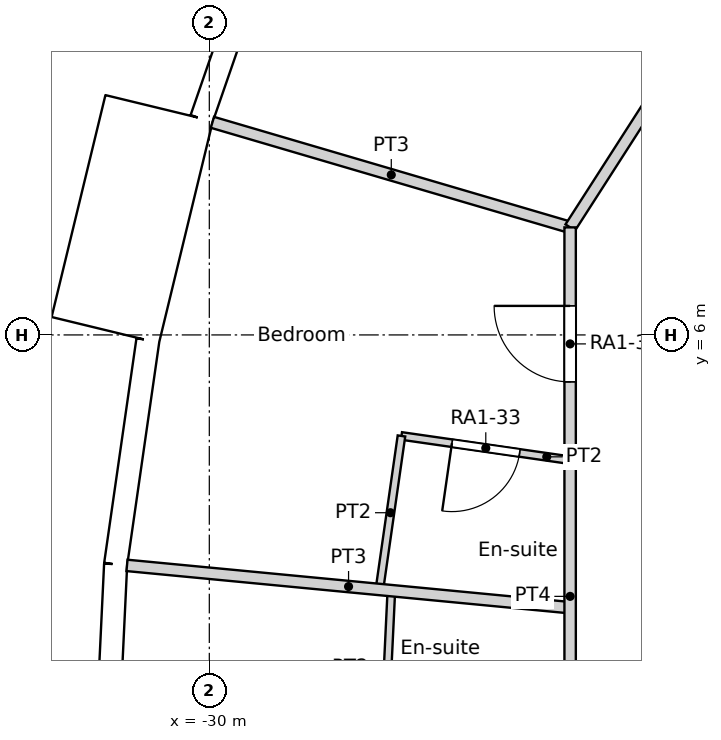
"""IFC4 building model, lengths in metres.
Left out: names, types, materials, properties, quantities, classifications, styles, units other than length and angle.
Written with IfcOpenShell. Run it as: python <this file> out.ifc"""

import sys

from ifc_helpers import new_model, si_unit, direction, frame, frame_2d, origin, origin_2d, place, context, subcontext, project, spatial, rectangle, circle, extrude, element, fill, save


model = new_model("IFC4")
c1 = context("Model", 3, precision=1e-05, world=origin(), true_north=direction((0.0, 1.0)))
c2 = subcontext(c1, "Body", "Model", "MODEL_VIEW")
j1 = project(units=[si_unit("LENGTHUNIT", "METRE"), si_unit("PLANEANGLEUNIT", "RADIAN")], contexts=[c1])
p1 = place(None, origin())
s1 = spatial("IfcSite", under=j1, at=p1, CompositionType="ELEMENT")
p2 = place(p1, origin())
s2 = spatial("IfcBuilding", under=s1, at=p2, CompositionType="ELEMENT")
p3 = place(p2, frame((0.0, 0.0, 28.2)))
s3 = spatial("IfcBuildingStorey", under=s2, at=p3, CompositionType="ELEMENT", Elevation=28.2)
for number, where, z_axis, x_axis in (
    (1, (-29.048, 8.529, 0.0), (0.0, 0.0, 1.0), (1.0, 0.0, 0.0)),
    (2, (-30.137, 2.878, 0.0), (0.0, 0.0, 1.0), (1.0, 0.0, 0.0)),
):
    element("IfcColumn", number, at=place(p3, frame(where, z_axis=z_axis, x_axis=x_axis)), inside=s3, PredefinedType="COLUMN", context=c2, shape_type="SweptSolid", body=[
        extrude(circle(Radius=0.7, at=origin_2d()), origin(), (0.0, 0.0, 1.0), 3.6),
    ])
p4 = place(p3, frame((-24.382, 2.85, 0.0), z_axis=(0.0, 0.0, 1.0), x_axis=(1.0, 0.0, 0.0)))
e3 = element("IfcColumn", 3, at=p4, inside=s3, PredefinedType="COLUMN", context=c2, shape_type="SweptSolid", body=[
    extrude(circle(Radius=0.75, at=origin_2d()), origin(), (0.0, 0.0, 1.0), 3.6),
])
p5 = place(p3, frame((-29.127, 11.661, 0.0), z_axis=(0.0, 0.0, 1.0), x_axis=(-0.327096492592, -0.944990944154, 0.0)))
e4 = element("IfcWall", 4, at=p5, inside=s3, PredefinedType="SOLIDWALL", context=c2, shape_type="SweptSolid", body=[
    extrude(rectangle(XDim=2.979, YDim=0.3, at=frame_2d((1.49, 0.0))), origin(), (0.0, 0.0, 1.0), 3.15),
])
p6 = place(p5, frame((1.49, 0.0, 1.55)))
e5 = element("IfcOpeningElement", 5, at=p6, cuts=e4, PredefinedType="OPENING", context=c2, shape_type="SweptSolid", body=[
    extrude(circle(Radius=0.9, at=origin_2d()), frame((0.0, 0.16, 0.0), z_axis=(0.0, -1.0, 0.0), x_axis=(1.0, 0.0, 0.0)), (0.0, 0.0, 1.0), 0.32),
])
p7 = place(p3, frame((-30.661, 8.982, -0.45), z_axis=(0.0, 0.0, 1.0), x_axis=(-0.235751415068, -0.971813392732, 0.0)))
e6 = element("IfcWall", 6, at=p7, inside=s3, PredefinedType="ELEMENTEDWALL", context=c2, shape_type="SweptSolid", body=[
    extrude(rectangle(XDim=3.0, YDim=1.45, at=frame_2d((1.5, 0.0))), origin(), (0.0, 0.0, 1.0), 3.6),
])
p8 = place(p7, frame((1.5, 0.0, 2.0)))
e7 = element("IfcOpeningElement", 7, at=p8, cuts=e6, PredefinedType="OPENING", context=c2, shape_type="SweptSolid", body=[
    extrude(circle(Radius=0.9, at=origin_2d()), frame((0.0, 0.735, 0.0), z_axis=(0.0, -1.0, 0.0), x_axis=(1.0, 0.0, 0.0)), (0.0, 0.0, 1.0), 1.47),
])
p9 = place(p3, frame((-30.808, 5.932, 0.0), z_axis=(0.0, 0.0, 1.0), x_axis=(-0.142327539111, -0.989819615693, 0.0)))
e8 = element("IfcWall", 8, at=p9, inside=s3, PredefinedType="SOLIDWALL", context=c2, shape_type="SweptSolid", body=[
    extrude(rectangle(XDim=2.979, YDim=0.3, at=frame_2d((1.49, 0.0))), origin(), (0.0, 0.0, 1.0), 3.15),
])
p10 = place(p9, frame((1.49, 0.0, 1.55)))
e9 = element("IfcOpeningElement", 9, at=p10, cuts=e8, PredefinedType="OPENING", context=c2, shape_type="SweptSolid", body=[
    extrude(circle(Radius=0.9, at=origin_2d()), frame((0.0, 0.16, 0.0), z_axis=(0.0, -1.0, 0.0), x_axis=(1.0, 0.0, 0.0)), (0.0, 0.0, 1.0), 0.32),
])
p11 = place(p3, frame((-31.232, 2.982, 0.0), z_axis=(0.0, 0.0, 1.0), x_axis=(-0.047522328113, -0.998870175914, 0.0)))
e10 = element("IfcWall", 10, at=p11, inside=s3, PredefinedType="SOLIDWALL", context=c2, shape_type="SweptSolid", body=[
    extrude(rectangle(XDim=2.98, YDim=0.3, at=frame_2d((1.49, 0.0))), origin(), (0.0, 0.0, 1.0), 3.15),
])
p12 = place(p11, frame((1.49, 0.0, 1.55)))
e11 = element("IfcOpeningElement", 11, at=p12, cuts=e10, PredefinedType="OPENING", context=c2, shape_type="SweptSolid", body=[
    extrude(circle(Radius=0.9, at=origin_2d()), frame((0.0, 0.16, 0.0), z_axis=(0.0, -1.0, 0.0), x_axis=(1.0, 0.0, 0.0)), (0.0, 0.0, 1.0), 0.32),
])
p13 = place(p3, frame((-25.251, 7.414, 0.0), z_axis=(0.0, 0.0, 1.0), x_axis=(0.540498462047, 0.84134500208, 0.0)))
e12 = element("IfcWall", 12, at=p13, inside=s3, PredefinedType="PARTITIONING", context=c2, shape_type="SweptSolid", body=[
    extrude(rectangle(XDim=12.811, YDim=0.15, at=frame_2d((6.405, 0.0))), origin(), (0.0, 0.0, 1.0), 3.15),
])
p14 = place(p13, frame((10.817, 0.0, 0.0)))
e13 = element("IfcOpeningElement", 13, at=p14, cuts=e12, PredefinedType="OPENING", context=c2, shape_type="SweptSolid", body=[
    extrude(rectangle(XDim=1.0, YDim=2.1, at=frame_2d((0.5, 1.05))), frame((0.0, 0.075, 0.0), z_axis=(0.0, -1.0, 0.0), x_axis=(1.0, 0.0, 0.0)), (0.0, 0.0, 1.0), 0.15),
])
p15 = place(p13, frame((4.415, 0.0, 0.0)))
e14 = element("IfcOpeningElement", 14, at=p15, cuts=e12, PredefinedType="OPENING", context=c2, shape_type="SweptSolid", body=[
    extrude(rectangle(XDim=1.0, YDim=2.04, at=frame_2d((0.5, 1.02))), frame((0.0, 0.075, 0.0), z_axis=(0.0, -1.0, 0.0), x_axis=(1.0, 0.0, 0.0)), (0.0, 0.0, 1.0), 0.15),
])
p16 = place(p3, frame((-25.253, -7.415, 0.0), z_axis=(0.0, 0.0, 1.0), x_axis=(0.0, 1.0, 0.0)))
e15 = element("IfcWall", 15, at=p16, inside=s3, PredefinedType="PARTITIONING", context=c2, shape_type="SweptSolid", body=[
    extrude(rectangle(XDim=14.83, YDim=0.15, at=frame_2d((7.415, 0.0))), origin(), (0.0, 0.0, 1.0), 3.15),
])
p17 = place(p16, frame((12.797, 0.0, 0.0)))
e16 = element("IfcOpeningElement", 16, at=p17, cuts=e15, PredefinedType="OPENING", context=c2, shape_type="SweptSolid", body=[
    extrude(rectangle(XDim=1.0, YDim=2.1, at=frame_2d((0.5, 1.05))), frame((0.0, 0.075, 0.0), z_axis=(0.0, -1.0, 0.0), x_axis=(1.0, 0.0, 0.0)), (0.0, 0.0, 1.0), 0.15),
])
p18 = place(p16, frame((5.954, 0.0, 0.0)))
e17 = element("IfcOpeningElement", 17, at=p18, cuts=e15, PredefinedType="OPENING", context=c2, shape_type="SweptSolid", body=[
    extrude(rectangle(XDim=1.0, YDim=2.1, at=frame_2d((0.5, 1.05))), frame((0.0, 0.075, 0.0), z_axis=(0.0, -1.0, 0.0), x_axis=(1.0, 0.0, 0.0)), (0.0, 0.0, 1.0), 0.15),
])
p19 = place(p16, frame((1.034, 0.0, 0.0)))
e18 = element("IfcOpeningElement", 18, at=p19, cuts=e15, PredefinedType="OPENING", context=c2, shape_type="SweptSolid", body=[
    extrude(rectangle(XDim=1.0, YDim=2.1, at=frame_2d((0.5, 1.05))), frame((0.0, 0.075, 0.0), z_axis=(0.0, -1.0, 0.0), x_axis=(1.0, 0.0, 0.0)), (0.0, 0.0, 1.0), 0.15),
])
p20 = place(p3, frame((-29.959, 8.797, 0.0), z_axis=(0.0, 0.0, 1.0), x_axis=(0.959478767209, -0.281780934902, 0.0)))
e19 = element("IfcWall", 19, at=p20, inside=s3, PredefinedType="PARTITIONING", context=c2, shape_type="SweptSolid", body=[
    extrude(rectangle(XDim=4.905, YDim=0.15, at=frame_2d((2.452, 0.0))), origin(), (0.0, 0.0, 1.0), 3.15),
])
p21 = place(p3, frame((-27.472, 4.671, 0.0), z_axis=(0.0, 0.0, 1.0), x_axis=(0.989833725002, -0.142229381104, 0.0)))
e20 = element("IfcWall", 20, at=p21, inside=s3, PredefinedType="PARTITIONING", context=c2, shape_type="SweptSolid", body=[
    extrude(rectangle(XDim=2.242, YDim=0.1, at=frame_2d((1.121, 0.0))), origin(), (0.0, 0.0, 1.0), 3.15),
])
p22 = place(p21, frame((0.671, 0.0, 0.0)))
e21 = element("IfcOpeningElement", 21, at=p22, cuts=e20, PredefinedType="OPENING", context=c2, shape_type="SweptSolid", body=[
    extrude(rectangle(XDim=0.9, YDim=2.04, at=frame_2d((0.45, 1.02))), frame((0.0, 0.05, 0.0), z_axis=(0.0, -1.0, 0.0), x_axis=(1.0, 0.0, 0.0)), (0.0, 0.0, 1.0), 0.1),
])
p23 = place(p3, frame((-27.762, 2.651, 0.0), z_axis=(0.0, 0.0, 1.0), x_axis=(0.142124766346, 0.989848751472, 0.0)))
e22 = element("IfcWall", 22, at=p23, inside=s3, PredefinedType="PARTITIONING", context=c2, shape_type="SweptSolid", body=[
    extrude(rectangle(XDim=2.041, YDim=0.1, at=frame_2d((1.021, 0.0))), origin(), (0.0, 0.0, 1.0), 3.15),
])
p24 = place(p3, frame((-31.083, 2.968, 0.0), z_axis=(0.0, 0.0, 1.0), x_axis=(0.995476905331, -0.095003847037, 0.0)))
e23 = element("IfcWall", 23, at=p24, inside=s3, PredefinedType="PARTITIONING", context=c2, shape_type="SweptSolid", body=[
    extrude(rectangle(XDim=5.857, YDim=0.15, at=frame_2d((2.928, 0.0))), origin(), (0.0, 0.0, 1.0), 3.15),
])
p25 = place(p3, frame((-27.702, 0.605, 0.0), z_axis=(0.0, 0.0, 1.0), x_axis=(0.047667833557, 0.998863242713, 0.0)))
e24 = element("IfcWall", 24, at=p25, inside=s3, PredefinedType="PARTITIONING", context=c2, shape_type="SweptSolid", body=[
    extrude(rectangle(XDim=2.033, YDim=0.1, at=frame_2d((1.017, 0.0))), origin(), (0.0, 0.0, 1.0), 3.15),
])
p26 = place(p6, origin())
e25 = element("IfcWindow", 25, at=p26, inside=s3, PartitioningType="SINGLE_PANEL", PredefinedType="WINDOW", context=c2, shape_type="SweptSolid", body=[
    extrude(circle(Radius=0.9, at=origin_2d()), frame((0.0, 0.12, 0.0), z_axis=(0.0, -1.0, 0.0), x_axis=(1.0, 0.0, 0.0)), (0.0, 0.0, 1.0), 0.1),
])
fill(e5, e25)
p27 = place(p8, origin())
e26 = element("IfcWindow", 26, at=p27, inside=s3, PartitioningType="SINGLE_PANEL", PredefinedType="WINDOW", context=c2, shape_type="SweptSolid", body=[
    extrude(circle(Radius=0.9, at=origin_2d()), frame((0.0, 0.695, 0.0), z_axis=(0.0, -1.0, 0.0), x_axis=(1.0, 0.0, 0.0)), (0.0, 0.0, 1.0), 0.1),
])
fill(e7, e26)
p28 = place(p10, origin())
e27 = element("IfcWindow", 27, at=p28, inside=s3, PartitioningType="SINGLE_PANEL", PredefinedType="WINDOW", context=c2, shape_type="SweptSolid", body=[
    extrude(circle(Radius=0.9, at=origin_2d()), frame((0.0, 0.12, 0.0), z_axis=(0.0, -1.0, 0.0), x_axis=(1.0, 0.0, 0.0)), (0.0, 0.0, 1.0), 0.1),
])
fill(e9, e27)
p29 = place(p12, origin())
e28 = element("IfcWindow", 28, at=p29, inside=s3, PartitioningType="SINGLE_PANEL", PredefinedType="WINDOW", context=c2, shape_type="SweptSolid", body=[
    extrude(circle(Radius=0.9, at=origin_2d()), frame((0.0, 0.12, 0.0), z_axis=(0.0, -1.0, 0.0), x_axis=(1.0, 0.0, 0.0)), (0.0, 0.0, 1.0), 0.1),
])
fill(e11, e28)
p30 = place(p22, origin())
e29 = element("IfcDoor", 29, at=p30, inside=s3, OperationType="SINGLE_SWING_RIGHT", PredefinedType="DOOR", context=c2, shape_type="SweptSolid", body=[
    extrude(rectangle(XDim=0.9, YDim=2.04, at=frame_2d((0.45, 1.02))), frame((0.0, 0.025, 0.0), z_axis=(0.0, -1.0, 0.0), x_axis=(1.0, 0.0, 0.0)), (0.0, 0.0, 1.0), 0.05),
])
fill(e21, e29)
p31 = place(p17, origin())
e30 = element("IfcDoor", 30, at=p31, inside=s3, OperationType="SINGLE_SWING_RIGHT", PredefinedType="DOOR", context=c2, shape_type="SweptSolid", body=[
    extrude(rectangle(XDim=1.0, YDim=2.1, at=frame_2d((0.5, 1.05))), frame((0.0, 0.025, 0.0), z_axis=(0.0, -1.0, 0.0), x_axis=(1.0, 0.0, 0.0)), (0.0, 0.0, 1.0), 0.05),
])
fill(e16, e30)
save(model, sys.argv[1])
